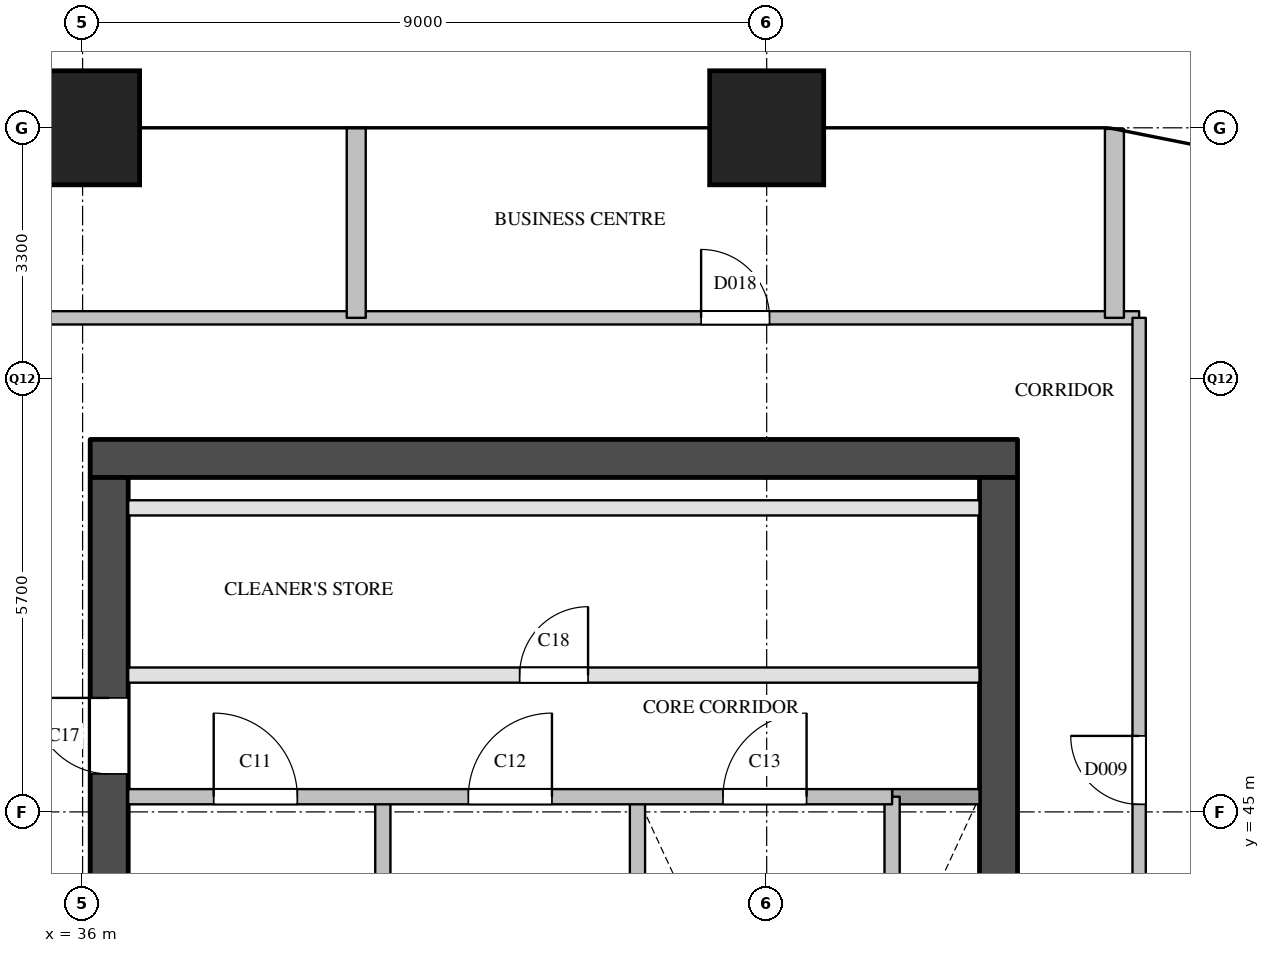
"""IFC4 building model, lengths in metres.
Left out: names, types, materials, properties, quantities, classifications, styles, units other than length and angle.
Written with IfcOpenShell. Run it as: python <this file> out.ifc"""

import sys

from ifc_helpers import new_model, si_unit, direction, frame, frame_2d, origin, origin_2d, place, context, subcontext, project, spatial, rectangle, extrude, element, fill, save


model = new_model("IFC4")
c1 = context("Model", 3, precision=1e-05, world=origin(), true_north=direction((0.0, 1.0)))
c2 = subcontext(c1, "Body", "Model", "MODEL_VIEW")
j1 = project(units=[si_unit("LENGTHUNIT", "METRE"), si_unit("PLANEANGLEUNIT", "RADIAN")], contexts=[c1])
p1 = place(None, origin())
s1 = spatial("IfcSite", under=j1, at=p1, CompositionType="ELEMENT")
p2 = place(p1, origin())
s2 = spatial("IfcBuilding", under=s1, at=p2, CompositionType="ELEMENT")
p3 = place(p2, frame((0.0, 0.0, 166.1)))
s3 = spatial("IfcBuildingStorey", under=s2, at=p3, CompositionType="ELEMENT", Elevation=166.1)
for number, where, z_axis, x_axis in (
    (1, (36.0, 54.0, 0.0), (0.0, 0.0, 1.0), (1.0, 0.0, 0.0)),
    (2, (45.0, 54.0, 0.0), (0.0, 0.0, 1.0), (1.0, 0.0, 0.0)),
):
    element("IfcColumn", number, at=place(p3, frame(where, z_axis=z_axis, x_axis=x_axis)), inside=s3, PredefinedType="COLUMN", context=c2, shape_type="SweptSolid", body=[
        extrude(rectangle(XDim=1.5, YDim=1.5, at=origin_2d()), origin(), (0.0, 0.0, 1.0), 3.9),
    ])
p4 = place(p3, frame((36.1, 49.65, 0.0), z_axis=(0.0, 0.0, 1.0), x_axis=(1.0, 0.0, 0.0)))
e3 = element("IfcWall", 3, at=p4, inside=s3, PredefinedType="SHEAR", context=c2, shape_type="SweptSolid", body=[
    extrude(rectangle(XDim=12.2, YDim=0.5, at=frame_2d((6.1, 0.0))), origin(), (0.0, 0.0, 1.0), 3.6),
])
p5 = place(p3, frame((36.35, 29.1, 0.0), z_axis=(0.0, 0.0, 1.0), x_axis=(0.0, 1.0, 0.0)))
e4 = element("IfcWall", 4, at=p5, inside=s3, PredefinedType="SHEAR", context=c2, shape_type="SweptSolid", body=[
    extrude(rectangle(XDim=20.3, YDim=0.5, at=frame_2d((10.15, 0.0))), origin(), (0.0, 0.0, 1.0), 3.6),
])
p6 = place(p5, frame((3.6, 0.0, 0.0)))
e5 = element("IfcOpeningElement", 5, at=p6, cuts=e4, PredefinedType="OPENING", context=c2, shape_type="SweptSolid", body=[
    extrude(rectangle(XDim=1.8, YDim=2.1, at=frame_2d((0.9, 1.05))), frame((0.0, 0.26, 0.0), z_axis=(0.0, -1.0, 0.0), x_axis=(1.0, 0.0, 0.0)), (0.0, 0.0, 1.0), 0.52),
])
p7 = place(p5, frame((16.4, 0.0, 0.0)))
e6 = element("IfcOpeningElement", 6, at=p7, cuts=e4, PredefinedType="OPENING", context=c2, shape_type="SweptSolid", body=[
    extrude(rectangle(XDim=1.0, YDim=2.1, at=frame_2d((0.5, 1.05))), frame((0.0, 0.26, 0.0), z_axis=(0.0, -1.0, 0.0), x_axis=(1.0, 0.0, 0.0)), (0.0, 0.0, 1.0), 0.52),
])
p8 = place(p3, frame((48.05, 29.1, 0.0), z_axis=(0.0, 0.0, 1.0), x_axis=(0.0, 1.0, 0.0)))
e7 = element("IfcWall", 7, at=p8, inside=s3, PredefinedType="SHEAR", context=c2, shape_type="SweptSolid", body=[
    extrude(rectangle(XDim=20.3, YDim=0.5, at=frame_2d((10.15, 0.0))), origin(), (0.0, 0.0, 1.0), 3.6),
])
p9 = place(p8, frame((12.5, 0.0, 0.0)))
e8 = element("IfcOpeningElement", 8, at=p9, cuts=e7, PredefinedType="OPENING", context=c2, shape_type="SweptSolid", body=[
    extrude(rectangle(XDim=0.7, YDim=2.1, at=frame_2d((0.35, 1.05))), frame((0.0, 0.26, 0.0), z_axis=(0.0, -1.0, 0.0), x_axis=(1.0, 0.0, 0.0)), (0.0, 0.0, 1.0), 0.52),
])
p10 = place(p8, frame((3.9, 0.0, 0.0)))
e9 = element("IfcOpeningElement", 9, at=p10, cuts=e7, PredefinedType="OPENING", context=c2, shape_type="SweptSolid", body=[
    extrude(rectangle(XDim=1.8, YDim=2.1, at=frame_2d((0.9, 1.05))), frame((0.0, 0.26, 0.0), z_axis=(0.0, -1.0, 0.0), x_axis=(1.0, 0.0, 0.0)), (0.0, 0.0, 1.0), 0.52),
])
for number, where, z_axis, x_axis in (
    (10, (39.95, 40.78, 0.0), (0.0, 0.0, 1.0), (0.0, 1.0, 0.0)),
    (11, (43.3, 40.78, 0.0), (0.0, 0.0, 1.0), (0.0, 1.0, 0.0)),
    (12, (46.65, 40.78, 0.0), (0.0, 0.0, 1.0), (0.0, 1.0, 0.0)),
):
    element("IfcWall", number, at=place(p3, frame(where, z_axis=z_axis, x_axis=x_axis)), inside=s3, PredefinedType="SOLIDWALL", context=c2, shape_type="SweptSolid", body=[
        extrude(rectangle(XDim=4.42, YDim=0.2, at=frame_2d((2.21, 0.0))), origin(), (0.0, 0.0, 1.0), 3.6),
    ])
p11 = place(p3, frame((46.65, 45.2, 0.0), z_axis=(0.0, 0.0, 1.0), x_axis=(1.0, 0.0, 0.0)))
e13 = element("IfcWall", 13, at=p11, inside=s3, PredefinedType="SOLIDWALL", context=c2, shape_type="SweptSolid", body=[
    extrude(rectangle(XDim=1.15, YDim=0.2, at=frame_2d((0.575, 0.0))), origin(), (0.0, 0.0, 1.0), 3.6),
])
p12 = place(p3, frame((36.6, 45.2, 0.0), z_axis=(0.0, 0.0, 1.0), x_axis=(1.0, 0.0, 0.0)))
e14 = element("IfcWall", 14, at=p12, inside=s3, PredefinedType="SOLIDWALL", context=c2, shape_type="SweptSolid", body=[
    extrude(rectangle(XDim=10.05, YDim=0.2, at=frame_2d((5.025, 0.0))), origin(), (0.0, 0.0, 1.0), 3.6),
])
p13 = place(p12, frame((1.125, 0.0, 0.0)))
e15 = element("IfcOpeningElement", 15, at=p13, cuts=e14, PredefinedType="OPENING", context=c2, shape_type="SweptSolid", body=[
    extrude(rectangle(XDim=1.1, YDim=2.1, at=frame_2d((0.55, 1.05))), frame((0.0, 0.11, 0.0), z_axis=(0.0, -1.0, 0.0), x_axis=(1.0, 0.0, 0.0)), (0.0, 0.0, 1.0), 0.22),
])
p14 = place(p12, frame((4.475, 0.0, 0.0)))
e16 = element("IfcOpeningElement", 16, at=p14, cuts=e14, PredefinedType="OPENING", context=c2, shape_type="SweptSolid", body=[
    extrude(rectangle(XDim=1.1, YDim=2.1, at=frame_2d((0.55, 1.05))), frame((0.0, 0.11, 0.0), z_axis=(0.0, -1.0, 0.0), x_axis=(1.0, 0.0, 0.0)), (0.0, 0.0, 1.0), 0.22),
])
p15 = place(p12, frame((7.825, 0.0, 0.0)))
e17 = element("IfcOpeningElement", 17, at=p15, cuts=e14, PredefinedType="OPENING", context=c2, shape_type="SweptSolid", body=[
    extrude(rectangle(XDim=1.1, YDim=2.1, at=frame_2d((0.55, 1.05))), frame((0.0, 0.11, 0.0), z_axis=(0.0, -1.0, 0.0), x_axis=(1.0, 0.0, 0.0)), (0.0, 0.0, 1.0), 0.22),
])
p16 = place(p3, frame((36.6, 46.8, 0.0), z_axis=(0.0, 0.0, 1.0), x_axis=(1.0, 0.0, 0.0)))
e18 = element("IfcWall", 18, at=p16, inside=s3, PredefinedType="PARTITIONING", context=c2, shape_type="SweptSolid", body=[
    extrude(rectangle(XDim=11.2, YDim=0.2, at=frame_2d((5.6, 0.0))), origin(), (0.0, 0.0, 1.0), 3.6),
])
p17 = place(p16, frame((5.15, 0.0, 0.0)))
e19 = element("IfcOpeningElement", 19, at=p17, cuts=e18, PredefinedType="OPENING", context=c2, shape_type="SweptSolid", body=[
    extrude(rectangle(XDim=0.9, YDim=2.1, at=frame_2d((0.45, 1.05))), frame((0.0, 0.11, 0.0), z_axis=(0.0, -1.0, 0.0), x_axis=(1.0, 0.0, 0.0)), (0.0, 0.0, 1.0), 0.22),
])
p18 = place(p3, frame((36.6, 49.0, 0.0), z_axis=(0.0, 0.0, 1.0), x_axis=(1.0, 0.0, 0.0)))
e20 = element("IfcWall", 20, at=p18, inside=s3, PredefinedType="PARTITIONING", context=c2, shape_type="SweptSolid", body=[
    extrude(rectangle(XDim=11.2, YDim=0.2, at=frame_2d((5.6, 0.0))), origin(), (0.0, 0.0, 1.0), 3.6),
])
p19 = place(p3, frame((34.5, 51.5, 0.0), z_axis=(0.0, 0.0, 1.0), x_axis=(1.0, 0.0, 0.0)))
e21 = element("IfcWall", 21, at=p19, inside=s3, PredefinedType="PARTITIONING", context=c2, shape_type="SweptSolid", body=[
    extrude(rectangle(XDim=15.4, YDim=0.175, at=frame_2d((7.7, 0.0))), origin(), (0.0, 0.0, 1.0), 3.6),
])
p20 = place(p19, frame((9.637, 0.0, 0.0)))
e22 = element("IfcOpeningElement", 22, at=p20, cuts=e21, PredefinedType="OPENING", context=c2, shape_type="SweptSolid", body=[
    extrude(rectangle(XDim=0.9, YDim=2.1, at=frame_2d((0.45, 1.05))), frame((0.0, 0.097, 0.0), z_axis=(0.0, -1.0, 0.0), x_axis=(1.0, 0.0, 0.0)), (0.0, 0.0, 1.0), 0.195),
])
p21 = place(p3, frame((49.9, 28.5, 0.0), z_axis=(0.0, 0.0, 1.0), x_axis=(0.0, 1.0, 0.0)))
e23 = element("IfcWall", 23, at=p21, inside=s3, PredefinedType="PARTITIONING", context=c2, shape_type="SweptSolid", body=[
    extrude(rectangle(XDim=23.0, YDim=0.175, at=frame_2d((11.5, 0.0))), origin(), (0.0, 0.0, 1.0), 3.6),
])
p22 = place(p21, frame((3.3, 0.0, 0.0)))
e24 = element("IfcOpeningElement", 24, at=p22, cuts=e23, PredefinedType="OPENING", context=c2, shape_type="SweptSolid", body=[
    extrude(rectangle(XDim=0.9, YDim=2.1, at=frame_2d((0.45, 1.05))), frame((0.0, 0.097, 0.0), z_axis=(0.0, -1.0, 0.0), x_axis=(1.0, 0.0, 0.0)), (0.0, 0.0, 1.0), 0.195),
])
p23 = place(p21, frame((8.85, 0.0, 0.0)))
e25 = element("IfcOpeningElement", 25, at=p23, cuts=e23, PredefinedType="OPENING", context=c2, shape_type="SweptSolid", body=[
    extrude(rectangle(XDim=0.9, YDim=2.1, at=frame_2d((0.45, 1.05))), frame((0.0, 0.097, 0.0), z_axis=(0.0, -1.0, 0.0), x_axis=(1.0, 0.0, 0.0)), (0.0, 0.0, 1.0), 0.195),
])
p24 = place(p21, frame((16.6, 0.0, 0.0)))
e26 = element("IfcOpeningElement", 26, at=p24, cuts=e23, PredefinedType="OPENING", context=c2, shape_type="SweptSolid", body=[
    extrude(rectangle(XDim=0.9, YDim=2.1, at=frame_2d((0.45, 1.05))), frame((0.0, 0.097, 0.0), z_axis=(0.0, -1.0, 0.0), x_axis=(1.0, 0.0, 0.0)), (0.0, 0.0, 1.0), 0.195),
])
p25 = place(p3, frame((39.6, 51.5, 0.0), z_axis=(0.0, 0.0, 1.0), x_axis=(0.0, 1.0, 0.0)))
e27 = element("IfcWall", 27, at=p25, inside=s3, PredefinedType="PARTITIONING", context=c2, shape_type="SweptSolid", body=[
    extrude(rectangle(XDim=2.5, YDim=0.25, at=frame_2d((1.25, 0.0))), origin(), (0.0, 0.0, 1.0), 2.6),
])
p26 = place(p3, frame((49.575, 51.5, 0.0), z_axis=(0.0, 0.0, 1.0), x_axis=(0.0, 1.0, 0.0)))
e28 = element("IfcWall", 28, at=p26, inside=s3, PredefinedType="PARTITIONING", context=c2, shape_type="SweptSolid", body=[
    extrude(rectangle(XDim=2.485, YDim=0.25, at=frame_2d((1.243, 0.0))), origin(), (0.0, 0.0, 1.0), 2.6),
])
p27 = place(p13, origin())
e29 = element("IfcDoor", 29, at=p27, inside=s3, OperationType="SINGLE_SWING_LEFT", PredefinedType="DOOR", context=c2, shape_type="SweptSolid", body=[
    extrude(rectangle(XDim=1.1, YDim=2.1, at=frame_2d((0.55, 1.05))), frame((0.0, 0.025, 0.0), z_axis=(0.0, -1.0, 0.0), x_axis=(1.0, 0.0, 0.0)), (0.0, 0.0, 1.0), 0.05),
])
fill(e15, e29)
p28 = place(p14, origin())
e30 = element("IfcDoor", 30, at=p28, inside=s3, OperationType="SINGLE_SWING_RIGHT", PredefinedType="DOOR", context=c2, shape_type="SweptSolid", body=[
    extrude(rectangle(XDim=1.1, YDim=2.1, at=frame_2d((0.55, 1.05))), frame((0.0, 0.025, 0.0), z_axis=(0.0, -1.0, 0.0), x_axis=(1.0, 0.0, 0.0)), (0.0, 0.0, 1.0), 0.05),
])
fill(e16, e30)
p29 = place(p15, origin())
e31 = element("IfcDoor", 31, at=p29, inside=s3, OperationType="SINGLE_SWING_RIGHT", PredefinedType="DOOR", context=c2, shape_type="SweptSolid", body=[
    extrude(rectangle(XDim=1.1, YDim=2.1, at=frame_2d((0.55, 1.05))), frame((0.0, 0.025, 0.0), z_axis=(0.0, -1.0, 0.0), x_axis=(1.0, 0.0, 0.0)), (0.0, 0.0, 1.0), 0.05),
])
fill(e17, e31)
p30 = place(p7, origin())
e32 = element("IfcDoor", 32, at=p30, inside=s3, OperationType="SINGLE_SWING_RIGHT", PredefinedType="DOOR", context=c2, shape_type="SweptSolid", body=[
    extrude(rectangle(XDim=1.0, YDim=2.1, at=frame_2d((0.5, 1.05))), frame((0.0, 0.025, 0.0), z_axis=(0.0, -1.0, 0.0), x_axis=(1.0, 0.0, 0.0)), (0.0, 0.0, 1.0), 0.05),
])
fill(e6, e32)
p31 = place(p17, origin())
e33 = element("IfcDoor", 33, at=p31, inside=s3, OperationType="SINGLE_SWING_RIGHT", PredefinedType="DOOR", context=c2, shape_type="SweptSolid", body=[
    extrude(rectangle(XDim=0.9, YDim=2.1, at=frame_2d((0.45, 1.05))), frame((0.0, 0.025, 0.0), z_axis=(0.0, -1.0, 0.0), x_axis=(1.0, 0.0, 0.0)), (0.0, 0.0, 1.0), 0.05),
])
fill(e19, e33)
p32 = place(p24, origin())
e34 = element("IfcDoor", 34, at=p32, inside=s3, OperationType="SINGLE_SWING_RIGHT", PredefinedType="DOOR", context=c2, shape_type="SweptSolid", body=[
    extrude(rectangle(XDim=0.9, YDim=2.1, at=frame_2d((0.45, 1.05))), frame((0.0, 0.025, 0.0), z_axis=(0.0, -1.0, 0.0), x_axis=(1.0, 0.0, 0.0)), (0.0, 0.0, 1.0), 0.05),
])
fill(e26, e34)
p33 = place(p20, origin())
e35 = element("IfcDoor", 35, at=p33, inside=s3, OperationType="SINGLE_SWING_LEFT", PredefinedType="DOOR", context=c2, shape_type="SweptSolid", body=[
    extrude(rectangle(XDim=0.9, YDim=2.1, at=frame_2d((0.45, 1.05))), frame((0.0, 0.025, 0.0), z_axis=(0.0, -1.0, 0.0), x_axis=(1.0, 0.0, 0.0)), (0.0, 0.0, 1.0), 0.05),
])
fill(e22, e35)
save(model, sys.argv[1])
